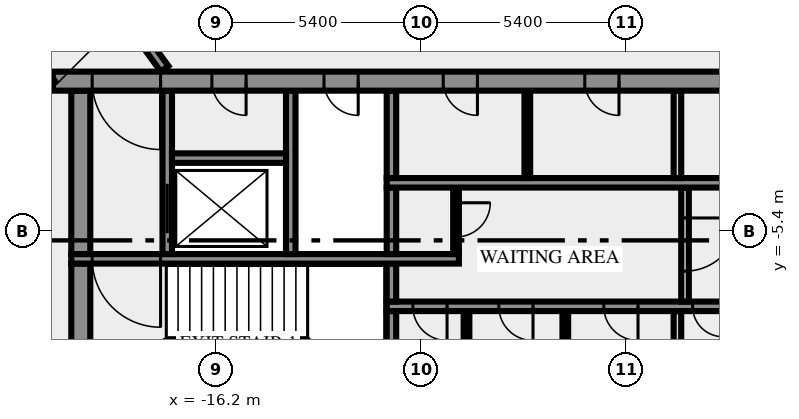
"""IFC4 building model, lengths in metres.
Left out: names, types, materials, properties, quantities, classifications, styles, units other than length and angle.
Written with IfcOpenShell. Run it as: python <this file> out.ifc"""

import sys

from ifc_helpers import new_model, si_unit, direction, frame, frame_2d, origin, place, context, subcontext, project, spatial, rectangle, extrude, element, fill, save


model = new_model("IFC4")
c1 = context("Model", 3, precision=1e-05, world=origin(), true_north=direction((0.0, 1.0)))
c2 = subcontext(c1, "Body", "Model", "MODEL_VIEW")
j1 = project(units=[si_unit("LENGTHUNIT", "METRE"), si_unit("PLANEANGLEUNIT", "RADIAN")], contexts=[c1])
p1 = place(None, origin())
s1 = spatial("IfcSite", under=j1, at=p1, CompositionType="ELEMENT")
p2 = place(p1, origin())
s2 = spatial("IfcBuilding", under=s1, at=p2, CompositionType="ELEMENT")
p3 = place(p2, frame((0.0, 0.0, 152.0)))
s3 = spatial("IfcBuildingStorey", under=s2, at=p3, CompositionType="ELEMENT", Elevation=152.0)
p4 = place(p3, frame((-19.75, -10.5, 0.0), z_axis=(0.0, 0.0, 1.0), x_axis=(0.0, 1.0, 0.0)))
e1 = element("IfcWall", 1, at=p4, inside=s3, PredefinedType="SHEAR", context=c2, shape_type="SweptSolid", body=[
    extrude(rectangle(XDim=4.25, YDim=0.5, at=frame_2d((2.125, 0.0))), origin(), (0.0, 0.0, 1.0), 3.65),
])
p5 = place(p3, frame((-11.575, -10.5, 0.0), z_axis=(0.0, 0.0, 1.0), x_axis=(0.0, 1.0, 0.0)))
e2 = element("IfcWall", 2, at=p5, inside=s3, PredefinedType="SHEAR", context=c2, shape_type="SweptSolid", body=[
    extrude(rectangle(XDim=3.0, YDim=0.25, at=frame_2d((1.5, 0.0))), origin(), (0.0, 0.0, 1.0), 3.65),
])
for number, where, z_axis, x_axis in (
    (3, (-9.6, -10.5, 0.0), (0.0, 0.0, 1.0), (0.0, 1.0, 0.0)),
    (4, (-7.0, -10.5, 0.0), (0.0, 0.0, 1.0), (0.0, 1.0, 0.0)),
):
    element("IfcWall", number, at=place(p3, frame(where, z_axis=z_axis, x_axis=x_axis)), inside=s3, PredefinedType="PARTITIONING", context=c2, shape_type="SweptSolid", body=[
        extrude(rectangle(XDim=3.0, YDim=0.15, at=frame_2d((1.5, 0.0))), origin(), (0.0, 0.0, 1.0), 3.65),
    ])
p6 = place(p3, frame((-4.05, -10.5, 0.0), z_axis=(0.0, 0.0, 1.0), x_axis=(0.0, 1.0, 0.0)))
e5 = element("IfcWall", 5, at=p6, inside=s3, PredefinedType="SOLIDWALL", context=c2, shape_type="SweptSolid", body=[
    extrude(rectangle(XDim=3.0, YDim=0.2, at=frame_2d((1.5, 0.0))), origin(), (0.0, 0.0, 1.0), 3.65),
])
p7 = place(p3, frame((11.7, -7.375, 0.0), z_axis=(0.0, 0.0, 1.0), x_axis=(-1.0, 0.0, 0.0)))
e6 = element("IfcWall", 6, at=p7, inside=s3, PredefinedType="SHEAR", context=c2, shape_type="SweptSolid", body=[
    extrude(rectangle(XDim=23.4, YDim=0.25, at=frame_2d((11.7, 0.0))), origin(), (0.0, 0.0, 1.0), 3.65),
])
p8 = place(p7, frame((21.812, 0.0, 0.0)))
e7 = element("IfcOpeningElement", 7, at=p8, cuts=e6, PredefinedType="OPENING", context=c2, shape_type="SweptSolid", body=[
    extrude(rectangle(XDim=0.9, YDim=2.1, at=frame_2d((0.45, 1.05))), frame((0.0, 0.135, 0.0), z_axis=(0.0, -1.0, 0.0), x_axis=(1.0, 0.0, 0.0)), (0.0, 0.0, 1.0), 0.27),
])
p9 = place(p7, frame((19.55, 0.0, 0.0)))
e8 = element("IfcOpeningElement", 8, at=p9, cuts=e6, PredefinedType="OPENING", context=c2, shape_type="SweptSolid", body=[
    extrude(rectangle(XDim=0.9, YDim=2.1, at=frame_2d((0.45, 1.05))), frame((0.0, 0.135, 0.0), z_axis=(0.0, -1.0, 0.0), x_axis=(1.0, 0.0, 0.0)), (0.0, 0.0, 1.0), 0.27),
])
p10 = place(p7, frame((16.787, 0.0, 0.0)))
e9 = element("IfcOpeningElement", 9, at=p10, cuts=e6, PredefinedType="OPENING", context=c2, shape_type="SweptSolid", body=[
    extrude(rectangle(XDim=0.9, YDim=2.1, at=frame_2d((0.45, 1.05))), frame((0.0, 0.135, 0.0), z_axis=(0.0, -1.0, 0.0), x_axis=(1.0, 0.0, 0.0)), (0.0, 0.0, 1.0), 0.27),
])
p11 = place(p7, frame((14.55, 0.0, 0.0)))
e10 = element("IfcOpeningElement", 10, at=p11, cuts=e6, PredefinedType="OPENING", context=c2, shape_type="SweptSolid", body=[
    extrude(rectangle(XDim=0.8, YDim=2.1, at=frame_2d((0.4, 1.05))), frame((0.0, 0.135, 0.0), z_axis=(0.0, -1.0, 0.0), x_axis=(1.0, 0.0, 0.0)), (0.0, 0.0, 1.0), 0.27),
])
p12 = place(p7, frame((12.8, 0.0, 0.0)))
e11 = element("IfcOpeningElement", 11, at=p12, cuts=e6, PredefinedType="OPENING", context=c2, shape_type="SweptSolid", body=[
    extrude(rectangle(XDim=0.9, YDim=2.1, at=frame_2d((0.45, 1.05))), frame((0.0, 0.135, 0.0), z_axis=(0.0, -1.0, 0.0), x_axis=(1.0, 0.0, 0.0)), (0.0, 0.0, 1.0), 0.27),
])
p13 = place(p7, frame((10.7, 0.0, 0.0)))
e12 = element("IfcOpeningElement", 12, at=p13, cuts=e6, PredefinedType="OPENING", context=c2, shape_type="SweptSolid", body=[
    extrude(rectangle(XDim=0.9, YDim=2.1, at=frame_2d((0.45, 1.05))), frame((0.0, 0.135, 0.0), z_axis=(0.0, -1.0, 0.0), x_axis=(1.0, 0.0, 0.0)), (0.0, 0.0, 1.0), 0.27),
])
p14 = place(p7, frame((8.35, 0.0, 0.0)))
e13 = element("IfcOpeningElement", 13, at=p14, cuts=e6, PredefinedType="OPENING", context=c2, shape_type="SweptSolid", body=[
    extrude(rectangle(XDim=1.1, YDim=2.1, at=frame_2d((0.55, 1.05))), frame((0.0, 0.135, 0.0), z_axis=(0.0, -1.0, 0.0), x_axis=(1.0, 0.0, 0.0)), (0.0, 0.0, 1.0), 0.27),
])
p15 = place(p7, frame((5.85, 0.0, 0.0)))
e14 = element("IfcOpeningElement", 14, at=p15, cuts=e6, PredefinedType="OPENING", context=c2, shape_type="SweptSolid", body=[
    extrude(rectangle(XDim=1.1, YDim=2.1, at=frame_2d((0.55, 1.05))), frame((0.0, 0.135, 0.0), z_axis=(0.0, -1.0, 0.0), x_axis=(1.0, 0.0, 0.0)), (0.0, 0.0, 1.0), 0.27),
])
p16 = place(p7, frame((3.35, 0.0, 0.0)))
e15 = element("IfcOpeningElement", 15, at=p16, cuts=e6, PredefinedType="OPENING", context=c2, shape_type="SweptSolid", body=[
    extrude(rectangle(XDim=1.1, YDim=2.1, at=frame_2d((0.55, 1.05))), frame((0.0, 0.135, 0.0), z_axis=(0.0, -1.0, 0.0), x_axis=(1.0, 0.0, 0.0)), (0.0, 0.0, 1.0), 0.27),
])
p17 = place(p7, frame((0.85, 0.0, 0.0)))
e16 = element("IfcOpeningElement", 16, at=p17, cuts=e6, PredefinedType="OPENING", context=c2, shape_type="SweptSolid", body=[
    extrude(rectangle(XDim=1.1, YDim=2.1, at=frame_2d((0.55, 1.05))), frame((0.0, 0.135, 0.0), z_axis=(0.0, -1.0, 0.0), x_axis=(1.0, 0.0, 0.0)), (0.0, 0.0, 1.0), 0.27),
])
p18 = place(p3, frame((-11.575, -7.25, 0.0), z_axis=(0.0, 0.0, 1.0), x_axis=(0.0, 1.0, 0.0)))
e17 = element("IfcWall", 17, at=p18, inside=s3, PredefinedType="SHEAR", context=c2, shape_type="SweptSolid", body=[
    extrude(rectangle(XDim=1.0, YDim=0.25, at=frame_2d((0.5, 0.0))), origin(), (0.0, 0.0, 1.0), 3.65),
])
p19 = place(p3, frame((-3.85, -4.25, 0.0), z_axis=(0.0, 0.0, 1.0), x_axis=(0.0, -1.0, 0.0)))
e18 = element("IfcWall", 18, at=p19, inside=s3, PredefinedType="SOLIDWALL", context=c2, shape_type="SweptSolid", body=[
    extrude(rectangle(XDim=3.0, YDim=0.2, at=frame_2d((1.5, 0.0))), origin(), (0.0, 0.0, 1.0), 3.65),
])
p20 = place(p19, frame((0.8, 0.0, 0.0)))
e19 = element("IfcOpeningElement", 19, at=p20, cuts=e18, PredefinedType="OPENING", context=c2, shape_type="SweptSolid", body=[
    extrude(rectangle(XDim=1.4, YDim=2.1, at=frame_2d((0.7, 1.05))), frame((0.0, 0.11, 0.0), z_axis=(0.0, -1.0, 0.0), x_axis=(1.0, 0.0, 0.0)), (0.0, 0.0, 1.0), 0.22),
])
p21 = place(p3, frame((-9.8, -6.125, 0.0), z_axis=(0.0, 0.0, 1.0), x_axis=(-1.0, 0.0, 0.0)))
e20 = element("IfcWall", 20, at=p21, inside=s3, PredefinedType="SHEAR", context=c2, shape_type="SweptSolid", body=[
    extrude(rectangle(XDim=10.2, YDim=0.25, at=frame_2d((5.1, 0.0))), origin(), (0.0, 0.0, 1.0), 3.65),
])
p22 = place(p21, frame((7.85, 0.0, 0.0)))
e21 = element("IfcOpeningElement", 21, at=p22, cuts=e20, PredefinedType="OPENING", context=c2, shape_type="SweptSolid", body=[
    extrude(rectangle(XDim=1.8, YDim=2.1, at=frame_2d((0.9, 1.05))), frame((0.0, 0.135, 0.0), z_axis=(0.0, -1.0, 0.0), x_axis=(1.0, 0.0, 0.0)), (0.0, 0.0, 1.0), 0.27),
])
p23 = place(p3, frame((-19.75, -6.0, 0.0), z_axis=(0.0, 0.0, 1.0), x_axis=(0.0, 1.0, 0.0)))
e22 = element("IfcWall", 22, at=p23, inside=s3, PredefinedType="SHEAR", context=c2, shape_type="SweptSolid", body=[
    extrude(rectangle(XDim=4.3, YDim=0.5, at=frame_2d((2.15, 0.0))), origin(), (0.0, 0.0, 1.0), 3.65),
])
p24 = place(p3, frame((-17.475, -6.0, 0.0), z_axis=(0.0, 0.0, 1.0), x_axis=(0.0, 1.0, 0.0)))
e23 = element("IfcWall", 23, at=p24, inside=s3, PredefinedType="SHEAR", context=c2, shape_type="SweptSolid", body=[
    extrude(rectangle(XDim=4.3, YDim=0.25, at=frame_2d((2.15, 0.0))), origin(), (0.0, 0.0, 1.0), 3.65),
])
p25 = place(p24, frame((0.55, 0.0, 0.0)))
e24 = element("IfcOpeningElement", 24, at=p25, cuts=e23, PredefinedType="OPENING", context=c2, shape_type="SweptSolid", body=[
    extrude(rectangle(XDim=1.3, YDim=2.1, at=frame_2d((0.65, 1.05))), frame((0.0, 0.135, 0.0), z_axis=(0.0, -1.0, 0.0), x_axis=(1.0, 0.0, 0.0)), (0.0, 0.0, 1.0), 0.27),
])
p26 = place(p3, frame((-14.225, -6.0, 0.0), z_axis=(0.0, 0.0, 1.0), x_axis=(0.0, 1.0, 0.0)))
e25 = element("IfcWall", 25, at=p26, inside=s3, PredefinedType="SHEAR", context=c2, shape_type="SweptSolid", body=[
    extrude(rectangle(XDim=4.3, YDim=0.25, at=frame_2d((2.15, 0.0))), origin(), (0.0, 0.0, 1.0), 3.65),
])
p27 = place(p3, frame((-11.575, -6.0, 0.0), z_axis=(0.0, 0.0, 1.0), x_axis=(0.0, 1.0, 0.0)))
e26 = element("IfcWall", 26, at=p27, inside=s3, PredefinedType="SHEAR", context=c2, shape_type="SweptSolid", body=[
    extrude(rectangle(XDim=1.75, YDim=0.25, at=frame_2d((0.875, 0.0))), origin(), (0.0, 0.0, 1.0), 3.65),
])
p28 = place(p3, frame((-9.875, -4.25, 0.0), z_axis=(0.0, 0.0, 1.0), x_axis=(0.0, -1.0, 0.0)))
e27 = element("IfcWall", 27, at=p28, inside=s3, PredefinedType="PARTITIONING", context=c2, shape_type="SweptSolid", body=[
    extrude(rectangle(XDim=1.75, YDim=0.15, at=frame_2d((0.875, 0.0))), origin(), (0.0, 0.0, 1.0), 3.65),
])
p29 = place(p28, frame((0.4, 0.0, 0.0)))
e28 = element("IfcOpeningElement", 28, at=p29, cuts=e27, PredefinedType="OPENING", context=c2, shape_type="SweptSolid", body=[
    extrude(rectangle(XDim=0.9, YDim=2.1, at=frame_2d((0.45, 1.05))), frame((0.0, 0.085, 0.0), z_axis=(0.0, -1.0, 0.0), x_axis=(1.0, 0.0, 0.0)), (0.0, 0.0, 1.0), 0.17),
])
p30 = place(p3, frame((-11.7, -4.125, 0.0), z_axis=(0.0, 0.0, 1.0), x_axis=(1.0, 0.0, 0.0)))
e29 = element("IfcWall", 29, at=p30, inside=s3, PredefinedType="SHEAR", context=c2, shape_type="SweptSolid", body=[
    extrude(rectangle(XDim=10.05, YDim=0.25, at=frame_2d((5.025, 0.0))), origin(), (0.0, 0.0, 1.0), 3.65),
])
p31 = place(p3, frame((-11.575, -4.0, 0.0), z_axis=(0.0, 0.0, 1.0), x_axis=(0.0, 1.0, 0.0)))
e30 = element("IfcWall", 30, at=p31, inside=s3, PredefinedType="SHEAR", context=c2, shape_type="SweptSolid", body=[
    extrude(rectangle(XDim=2.3, YDim=0.25, at=frame_2d((1.15, 0.0))), origin(), (0.0, 0.0, 1.0), 3.65),
])
p32 = place(p3, frame((-8.0, -4.0, 0.0), z_axis=(0.0, 0.0, 1.0), x_axis=(0.0, 1.0, 0.0)))
e31 = element("IfcWall", 31, at=p32, inside=s3, PredefinedType="PARTITIONING", context=c2, shape_type="SweptSolid", body=[
    extrude(rectangle(XDim=2.3, YDim=0.15, at=frame_2d((1.15, 0.0))), origin(), (0.0, 0.0, 1.0), 3.65),
])
p33 = place(p3, frame((-4.05, -4.0, 0.0), z_axis=(0.0, 0.0, 1.0), x_axis=(0.0, 1.0, 0.0)))
e32 = element("IfcWall", 32, at=p33, inside=s3, PredefinedType="SOLIDWALL", context=c2, shape_type="SweptSolid", body=[
    extrude(rectangle(XDim=2.3, YDim=0.2, at=frame_2d((1.15, 0.0))), origin(), (0.0, 0.0, 1.0), 3.65),
])
p34 = place(p3, frame((-17.35, -3.475, 0.0), z_axis=(0.0, 0.0, 1.0), x_axis=(1.0, 0.0, 0.0)))
e33 = element("IfcWall", 33, at=p34, inside=s3, PredefinedType="SHEAR", context=c2, shape_type="SweptSolid", body=[
    extrude(rectangle(XDim=3.0, YDim=0.25, at=frame_2d((1.5, 0.0))), origin(), (0.0, 0.0, 1.0), 3.65),
])
p35 = place(p3, frame((20.49, -1.45, 0.0), z_axis=(0.0, 0.0, 1.0), x_axis=(-1.0, 0.0, 0.0)))
e34 = element("IfcWall", 34, at=p35, inside=s3, PredefinedType="SHEAR", context=c2, shape_type="SweptSolid", body=[
    extrude(rectangle(XDim=40.98, YDim=0.5, at=frame_2d((20.49, 0.0))), origin(), (0.0, 0.0, 1.0), 3.65),
])
p36 = place(p35, frame((38.14, 0.0, 0.0)))
e35 = element("IfcOpeningElement", 35, at=p36, cuts=e34, PredefinedType="OPENING", context=c2, shape_type="SweptSolid", body=[
    extrude(rectangle(XDim=1.8, YDim=2.1, at=frame_2d((0.9, 1.05))), frame((0.0, 0.26, 0.0), z_axis=(0.0, -1.0, 0.0), x_axis=(1.0, 0.0, 0.0)), (0.0, 0.0, 1.0), 0.52),
])
p37 = place(p35, frame((35.89, 0.0, 0.0)))
e36 = element("IfcOpeningElement", 36, at=p37, cuts=e34, PredefinedType="OPENING", context=c2, shape_type="SweptSolid", body=[
    extrude(rectangle(XDim=0.9, YDim=2.1, at=frame_2d((0.45, 1.05))), frame((0.0, 0.26, 0.0), z_axis=(0.0, -1.0, 0.0), x_axis=(1.0, 0.0, 0.0)), (0.0, 0.0, 1.0), 0.52),
])
p38 = place(p35, frame((32.94, 0.0, 0.0)))
e37 = element("IfcOpeningElement", 37, at=p38, cuts=e34, PredefinedType="OPENING", context=c2, shape_type="SweptSolid", body=[
    extrude(rectangle(XDim=0.9, YDim=2.1, at=frame_2d((0.45, 1.05))), frame((0.0, 0.26, 0.0), z_axis=(0.0, -1.0, 0.0), x_axis=(1.0, 0.0, 0.0)), (0.0, 0.0, 1.0), 0.52),
])
p39 = place(p35, frame((29.802, 0.0, 0.0)))
e38 = element("IfcOpeningElement", 38, at=p39, cuts=e34, PredefinedType="OPENING", context=c2, shape_type="SweptSolid", body=[
    extrude(rectangle(XDim=0.9, YDim=2.1, at=frame_2d((0.45, 1.05))), frame((0.0, 0.26, 0.0), z_axis=(0.0, -1.0, 0.0), x_axis=(1.0, 0.0, 0.0)), (0.0, 0.0, 1.0), 0.52),
])
p40 = place(p35, frame((26.077, 0.0, 0.0)))
e39 = element("IfcOpeningElement", 39, at=p40, cuts=e34, PredefinedType="OPENING", context=c2, shape_type="SweptSolid", body=[
    extrude(rectangle(XDim=0.9, YDim=2.1, at=frame_2d((0.45, 1.05))), frame((0.0, 0.26, 0.0), z_axis=(0.0, -1.0, 0.0), x_axis=(1.0, 0.0, 0.0)), (0.0, 0.0, 1.0), 0.52),
])
p41 = place(p35, frame((19.59, 0.0, 0.0)))
e40 = element("IfcOpeningElement", 40, at=p41, cuts=e34, PredefinedType="OPENING", context=c2, shape_type="SweptSolid", body=[
    extrude(rectangle(XDim=2.0, YDim=2.1, at=frame_2d((1.0, 1.05))), frame((0.0, 0.26, 0.0), z_axis=(0.0, -1.0, 0.0), x_axis=(1.0, 0.0, 0.0)), (0.0, 0.0, 1.0), 0.52),
])
p42 = place(p35, frame((7.14, 0.0, 0.0)))
e41 = element("IfcOpeningElement", 41, at=p42, cuts=e34, PredefinedType="OPENING", context=c2, shape_type="SweptSolid", body=[
    extrude(rectangle(XDim=0.9, YDim=2.1, at=frame_2d((0.45, 1.05))), frame((0.0, 0.26, 0.0), z_axis=(0.0, -1.0, 0.0), x_axis=(1.0, 0.0, 0.0)), (0.0, 0.0, 1.0), 0.52),
])
p43 = place(p35, frame((5.028, 0.0, 0.0)))
e42 = element("IfcOpeningElement", 42, at=p43, cuts=e34, PredefinedType="OPENING", context=c2, shape_type="SweptSolid", body=[
    extrude(rectangle(XDim=0.8, YDim=2.1, at=frame_2d((0.4, 1.05))), frame((0.0, 0.26, 0.0), z_axis=(0.0, -1.0, 0.0), x_axis=(1.0, 0.0, 0.0)), (0.0, 0.0, 1.0), 0.52),
])
p44 = place(p35, frame((3.452, 0.0, 0.0)))
e43 = element("IfcOpeningElement", 43, at=p44, cuts=e34, PredefinedType="OPENING", context=c2, shape_type="SweptSolid", body=[
    extrude(rectangle(XDim=0.8, YDim=2.1, at=frame_2d((0.4, 1.05))), frame((0.0, 0.26, 0.0), z_axis=(0.0, -1.0, 0.0), x_axis=(1.0, 0.0, 0.0)), (0.0, 0.0, 1.0), 0.52),
])
p45 = place(p35, frame((1.04, 0.0, 0.0)))
e44 = element("IfcOpeningElement", 44, at=p45, cuts=e34, PredefinedType="OPENING", context=c2, shape_type="SweptSolid", body=[
    extrude(rectangle(XDim=1.8, YDim=2.1, at=frame_2d((0.9, 1.05))), frame((0.0, 0.26, 0.0), z_axis=(0.0, -1.0, 0.0), x_axis=(1.0, 0.0, 0.0)), (0.0, 0.0, 1.0), 0.52),
])
p46 = place(p3, frame((-20.531, -1.523, 0.0), z_axis=(0.0, 0.0, 1.0), x_axis=(-0.587785812891, 0.809016587076, 0.0)))
e45 = element("IfcWall", 45, at=p46, inside=s3, PredefinedType="SOLIDWALL", context=c2, shape_type="SweptSolid", body=[
    extrude(rectangle(XDim=28.67, YDim=0.25, at=frame_2d((14.335, 0.0))), origin(), (0.0, 0.0, 1.0), 3.65),
])
p47 = place(p46, frame((27.296, 0.0, 0.0)))
e46 = element("IfcOpeningElement", 46, at=p47, cuts=e45, PredefinedType="OPENING", context=c2, shape_type="SweptSolid", body=[
    extrude(rectangle(XDim=0.9, YDim=2.1, at=frame_2d((0.45, 1.05))), frame((0.0, 0.135, 0.0), z_axis=(0.0, -1.0, 0.0), x_axis=(1.0, 0.0, 0.0)), (0.0, 0.0, 1.0), 0.27),
])
p48 = place(p46, frame((11.866, 0.0, 0.0)))
e47 = element("IfcOpeningElement", 47, at=p48, cuts=e45, PredefinedType="OPENING", context=c2, shape_type="SweptSolid", body=[
    extrude(rectangle(XDim=0.9, YDim=2.1, at=frame_2d((0.45, 1.05))), frame((0.0, 0.135, 0.0), z_axis=(0.0, -1.0, 0.0), x_axis=(1.0, 0.0, 0.0)), (0.0, 0.0, 1.0), 0.27),
])
p49 = place(p46, frame((0.533, 0.0, 0.0)))
e48 = element("IfcOpeningElement", 48, at=p49, cuts=e45, PredefinedType="OPENING", context=c2, shape_type="SweptSolid", body=[
    extrude(rectangle(XDim=0.9, YDim=2.1, at=frame_2d((0.45, 1.05))), frame((0.0, 0.135, 0.0), z_axis=(0.0, -1.0, 0.0), x_axis=(1.0, 0.0, 0.0)), (0.0, 0.0, 1.0), 0.27),
])
p50 = place(p3, frame((-35.092, 23.027, 0.0), z_axis=(0.0, 0.0, 1.0), x_axis=(0.587784076945, -0.809017848313, 0.0)))
e49 = element("IfcWall", 49, at=p50, inside=s3, PredefinedType="SOLIDWALL", context=c2, shape_type="SweptSolid", body=[
    extrude(rectangle(XDim=29.853, YDim=0.25, at=frame_2d((14.927, 0.0))), origin(), (0.0, 0.0, 1.0), 3.65),
])
p51 = place(p50, frame((0.224, 0.0, 0.0)))
e50 = element("IfcOpeningElement", 50, at=p51, cuts=e49, PredefinedType="OPENING", context=c2, shape_type="SweptSolid", body=[
    extrude(rectangle(XDim=0.9, YDim=2.1, at=frame_2d((0.45, 1.05))), frame((0.0, 0.135, 0.0), z_axis=(0.0, -1.0, 0.0), x_axis=(1.0, 0.0, 0.0)), (0.0, 0.0, 1.0), 0.27),
])
p52 = place(p50, frame((25.512, 0.0, 0.0)))
e51 = element("IfcOpeningElement", 51, at=p52, cuts=e49, PredefinedType="OPENING", context=c2, shape_type="SweptSolid", body=[
    extrude(rectangle(XDim=0.9, YDim=2.1, at=frame_2d((0.45, 1.05))), frame((0.0, 0.135, 0.0), z_axis=(0.0, -1.0, 0.0), x_axis=(1.0, 0.0, 0.0)), (0.0, 0.0, 1.0), 0.27),
])
p53 = place(p8, origin())
e52 = element("IfcDoor", 52, at=p53, inside=s3, OperationType="SINGLE_SWING_RIGHT", PredefinedType="DOOR", context=c2, shape_type="SweptSolid", body=[
    extrude(rectangle(XDim=0.9, YDim=2.1, at=frame_2d((0.45, 1.05))), frame((0.0, 0.025, 0.0), z_axis=(0.0, -1.0, 0.0), x_axis=(1.0, 0.0, 0.0)), (0.0, 0.0, 1.0), 0.05),
])
fill(e7, e52)
p54 = place(p9, origin())
e53 = element("IfcDoor", 53, at=p54, inside=s3, OperationType="SINGLE_SWING_RIGHT", PredefinedType="DOOR", context=c2, shape_type="SweptSolid", body=[
    extrude(rectangle(XDim=0.9, YDim=2.1, at=frame_2d((0.45, 1.05))), frame((0.0, 0.025, 0.0), z_axis=(0.0, -1.0, 0.0), x_axis=(1.0, 0.0, 0.0)), (0.0, 0.0, 1.0), 0.05),
])
fill(e8, e53)
p55 = place(p10, origin())
e54 = element("IfcDoor", 54, at=p55, inside=s3, OperationType="SINGLE_SWING_RIGHT", PredefinedType="DOOR", context=c2, shape_type="SweptSolid", body=[
    extrude(rectangle(XDim=0.9, YDim=2.1, at=frame_2d((0.45, 1.05))), frame((0.0, 0.025, 0.0), z_axis=(0.0, -1.0, 0.0), x_axis=(1.0, 0.0, 0.0)), (0.0, 0.0, 1.0), 0.05),
])
fill(e9, e54)
p56 = place(p11, origin())
e55 = element("IfcDoor", 55, at=p56, inside=s3, OperationType="SINGLE_SWING_RIGHT", PredefinedType="DOOR", context=c2, shape_type="SweptSolid", body=[
    extrude(rectangle(XDim=0.8, YDim=2.1, at=frame_2d((0.4, 1.05))), frame((0.0, 0.025, 0.0), z_axis=(0.0, -1.0, 0.0), x_axis=(1.0, 0.0, 0.0)), (0.0, 0.0, 1.0), 0.05),
])
fill(e10, e55)
p57 = place(p20, origin())
e56 = element("IfcDoor", 56, at=p57, inside=s3, OperationType="DOUBLE_DOOR_SINGLE_SWING", PredefinedType="DOOR", context=c2, shape_type="SweptSolid", body=[
    extrude(rectangle(XDim=1.4, YDim=2.1, at=frame_2d((0.7, 1.05))), frame((0.0, 0.025, 0.0), z_axis=(0.0, -1.0, 0.0), x_axis=(1.0, 0.0, 0.0)), (0.0, 0.0, 1.0), 0.05),
])
fill(e19, e56)
p58 = place(p22, origin())
e57 = element("IfcDoor", 57, at=p58, inside=s3, OperationType="DOUBLE_DOOR_SINGLE_SWING", PredefinedType="DOOR", context=c2, shape_type="SweptSolid", body=[
    extrude(rectangle(XDim=1.8, YDim=2.1, at=frame_2d((0.9, 1.05))), frame((0.0, 0.025, 0.0), z_axis=(0.0, -1.0, 0.0), x_axis=(1.0, 0.0, 0.0)), (0.0, 0.0, 1.0), 0.05),
])
fill(e21, e57)
p59 = place(p25, origin())
e58 = element("IfcDoor", 58, at=p59, inside=s3, OperationType="DOUBLE_DOOR_SLIDING", PredefinedType="DOOR", context=c2, shape_type="SweptSolid", body=[
    extrude(rectangle(XDim=1.3, YDim=2.1, at=frame_2d((0.65, 1.05))), frame((0.0, 0.025, 0.0), z_axis=(0.0, -1.0, 0.0), x_axis=(1.0, 0.0, 0.0)), (0.0, 0.0, 1.0), 0.05),
])
fill(e24, e58)
p60 = place(p29, origin())
e59 = element("IfcDoor", 59, at=p60, inside=s3, OperationType="SINGLE_SWING_LEFT", PredefinedType="DOOR", context=c2, shape_type="SweptSolid", body=[
    extrude(rectangle(XDim=0.9, YDim=2.1, at=frame_2d((0.45, 1.05))), frame((0.0, 0.025, 0.0), z_axis=(0.0, -1.0, 0.0), x_axis=(1.0, 0.0, 0.0)), (0.0, 0.0, 1.0), 0.05),
])
fill(e28, e59)
p61 = place(p36, origin())
e60 = element("IfcDoor", 60, at=p61, inside=s3, OperationType="DOUBLE_DOOR_SINGLE_SWING", PredefinedType="DOOR", context=c2, shape_type="SweptSolid", body=[
    extrude(rectangle(XDim=1.8, YDim=2.1, at=frame_2d((0.9, 1.05))), frame((0.0, 0.025, 0.0), z_axis=(0.0, -1.0, 0.0), x_axis=(1.0, 0.0, 0.0)), (0.0, 0.0, 1.0), 0.05),
])
fill(e35, e60)
p62 = place(p37, origin())
e61 = element("IfcDoor", 61, at=p62, inside=s3, OperationType="SINGLE_SWING_RIGHT", PredefinedType="DOOR", context=c2, shape_type="SweptSolid", body=[
    extrude(rectangle(XDim=0.9, YDim=2.1, at=frame_2d((0.45, 1.05))), frame((0.0, 0.025, 0.0), z_axis=(0.0, -1.0, 0.0), x_axis=(1.0, 0.0, 0.0)), (0.0, 0.0, 1.0), 0.05),
])
fill(e36, e61)
p63 = place(p38, origin())
e62 = element("IfcDoor", 62, at=p63, inside=s3, OperationType="SINGLE_SWING_RIGHT", PredefinedType="DOOR", context=c2, shape_type="SweptSolid", body=[
    extrude(rectangle(XDim=0.9, YDim=2.1, at=frame_2d((0.45, 1.05))), frame((0.0, 0.025, 0.0), z_axis=(0.0, -1.0, 0.0), x_axis=(1.0, 0.0, 0.0)), (0.0, 0.0, 1.0), 0.05),
])
fill(e37, e62)
p64 = place(p39, origin())
e63 = element("IfcDoor", 63, at=p64, inside=s3, OperationType="SINGLE_SWING_RIGHT", PredefinedType="DOOR", context=c2, shape_type="SweptSolid", body=[
    extrude(rectangle(XDim=0.9, YDim=2.1, at=frame_2d((0.45, 1.05))), frame((0.0, 0.025, 0.0), z_axis=(0.0, -1.0, 0.0), x_axis=(1.0, 0.0, 0.0)), (0.0, 0.0, 1.0), 0.05),
])
fill(e38, e63)
p65 = place(p40, origin())
e64 = element("IfcDoor", 64, at=p65, inside=s3, OperationType="SINGLE_SWING_RIGHT", PredefinedType="DOOR", context=c2, shape_type="SweptSolid", body=[
    extrude(rectangle(XDim=0.9, YDim=2.1, at=frame_2d((0.45, 1.05))), frame((0.0, 0.025, 0.0), z_axis=(0.0, -1.0, 0.0), x_axis=(1.0, 0.0, 0.0)), (0.0, 0.0, 1.0), 0.05),
])
fill(e39, e64)
save(model, sys.argv[1])
